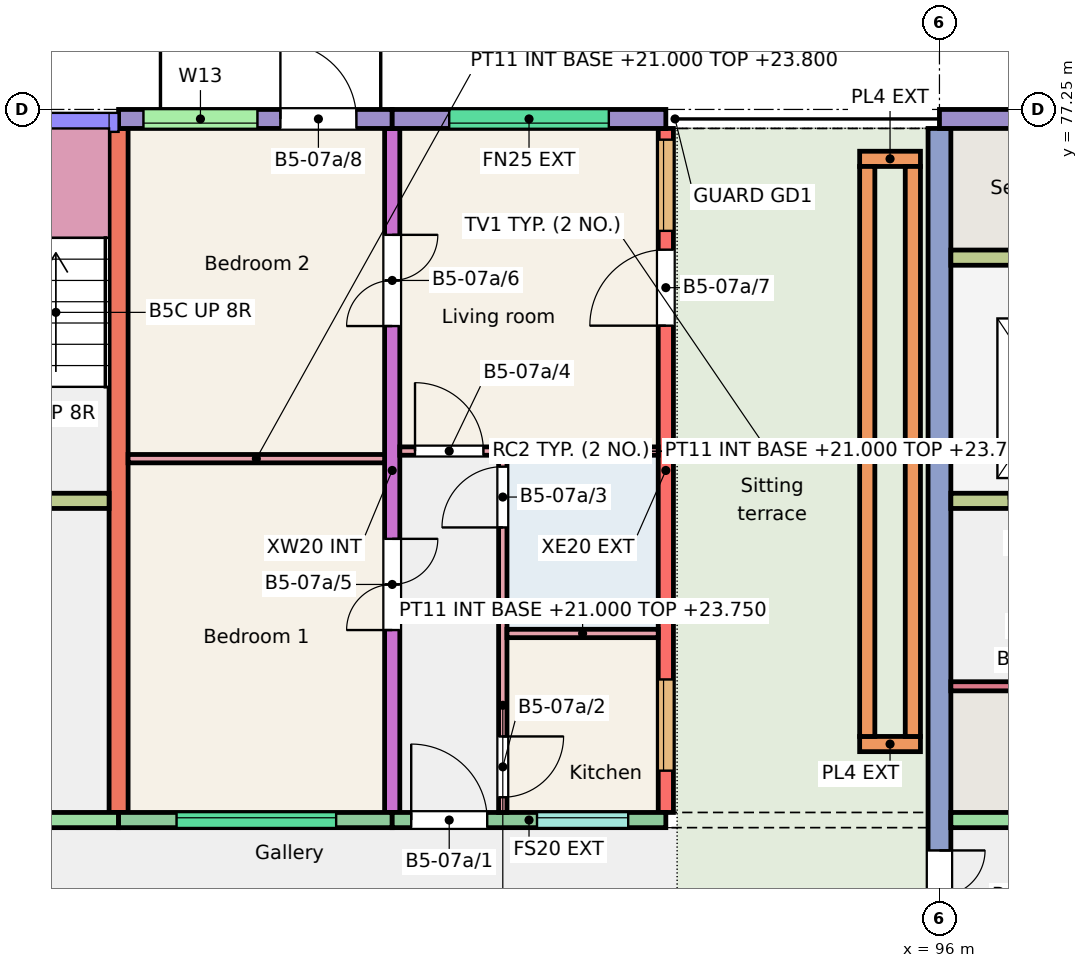
"""IFC4 building model, lengths in metres.
Left out: names, types, materials, properties, quantities, classifications, styles, units other than length and angle.
Written with IfcOpenShell. Run it as: python <this file> out.ifc"""

import sys

from ifc_helpers import new_model, si_unit, direction, frame, frame_2d, origin, place, context, subcontext, project, spatial, rectangle, extrude, element, fill, save


model = new_model("IFC4")
c1 = context("Model", 3, precision=1e-05, world=origin(), true_north=direction((0.0, 1.0)))
c2 = subcontext(c1, "Body", "Model", "MODEL_VIEW")
j1 = project(units=[si_unit("LENGTHUNIT", "METRE"), si_unit("PLANEANGLEUNIT", "RADIAN")], contexts=[c1])
p1 = place(None, origin())
s1 = spatial("IfcSite", under=j1, at=p1, CompositionType="ELEMENT")
p2 = place(p1, origin())
s2 = spatial("IfcBuilding", under=s1, at=p2, CompositionType="ELEMENT")
p3 = place(p2, frame((0.0, 0.0, 21.0)))
s3 = spatial("IfcBuildingStorey", under=s2, at=p3, CompositionType="ELEMENT", Elevation=21.0)
p4 = place(p3, frame((85.2, 68.0, 0.0), z_axis=(0.0, 0.0, 1.0), x_axis=(0.0, 1.0, 0.0)))
e1 = element("IfcWall", 1, at=p4, inside=s3, PredefinedType="SHEAR", context=c2, shape_type="SweptSolid", body=[
    extrude(rectangle(XDim=9.0, YDim=0.25, at=frame_2d((4.5, 0.0))), origin(), (0.0, 0.0, 1.0), 3.0),
])
p5 = place(p3, frame((88.8, 68.0, 0.0), z_axis=(0.0, 0.0, 1.0), x_axis=(0.0, 1.0, 0.0)))
e2 = element("IfcWall", 2, at=p5, inside=s3, PredefinedType="SHEAR", context=c2, shape_type="SweptSolid", body=[
    extrude(rectangle(XDim=9.0, YDim=0.2, at=frame_2d((4.5, 0.0))), origin(), (0.0, 0.0, 1.0), 3.0),
])
p6 = place(p5, frame((2.4, 0.0, 0.0)))
e3 = element("IfcOpeningElement", 3, at=p6, cuts=e2, PredefinedType="OPENING", context=c2, shape_type="SweptSolid", body=[
    extrude(rectangle(XDim=1.2, YDim=2.1, at=frame_2d((0.6, 1.05))), frame((0.0, 0.11, 0.0), z_axis=(0.0, -1.0, 0.0), x_axis=(1.0, 0.0, 0.0)), (0.0, 0.0, 1.0), 0.22),
])
p7 = place(p5, frame((6.4, 0.0, 0.0)))
e4 = element("IfcOpeningElement", 4, at=p7, cuts=e2, PredefinedType="OPENING", context=c2, shape_type="SweptSolid", body=[
    extrude(rectangle(XDim=1.2, YDim=2.1, at=frame_2d((0.6, 1.05))), frame((0.0, 0.11, 0.0), z_axis=(0.0, -1.0, 0.0), x_axis=(1.0, 0.0, 0.0)), (0.0, 0.0, 1.0), 0.22),
])
p8 = place(p3, frame((92.4, 68.0, 0.0), z_axis=(0.0, 0.0, 1.0), x_axis=(0.0, 1.0, 0.0)))
e5 = element("IfcWall", 5, at=p8, inside=s3, PredefinedType="SHEAR", context=c2, shape_type="SweptSolid", body=[
    extrude(rectangle(XDim=9.0, YDim=0.2, at=frame_2d((4.5, 0.0))), origin(), (0.0, 0.0, 1.0), 3.0),
])
p9 = place(p8, frame((0.55, 0.0, 0.9)))
e6 = element("IfcOpeningElement", 6, at=p9, cuts=e5, PredefinedType="OPENING", context=c2, shape_type="SweptSolid", body=[
    extrude(rectangle(XDim=1.2, YDim=1.5, at=frame_2d((0.6, 0.75))), frame((0.0, 0.11, 0.0), z_axis=(0.0, -1.0, 0.0), x_axis=(1.0, 0.0, 0.0)), (0.0, 0.0, 1.0), 0.22),
])
p10 = place(p8, frame((7.653, 0.0, 0.9)))
e7 = element("IfcOpeningElement", 7, at=p10, cuts=e5, PredefinedType="OPENING", context=c2, shape_type="SweptSolid", body=[
    extrude(rectangle(XDim=1.2, YDim=1.5, at=frame_2d((0.6, 0.75))), frame((0.0, 0.11, 0.0), z_axis=(0.0, -1.0, 0.0), x_axis=(1.0, 0.0, 0.0)), (0.0, 0.0, 1.0), 0.22),
])
p11 = place(p8, frame((6.405, 0.0, 0.0)))
e8 = element("IfcOpeningElement", 8, at=p11, cuts=e5, PredefinedType="OPENING", context=c2, shape_type="SweptSolid", body=[
    extrude(rectangle(XDim=1.0, YDim=2.1, at=frame_2d((0.5, 1.05))), frame((0.0, 0.11, 0.0), z_axis=(0.0, -1.0, 0.0), x_axis=(1.0, 0.0, 0.0)), (0.0, 0.0, 1.0), 0.22),
])
p12 = place(p3, frame((96.0, 66.0, 0.0), z_axis=(0.0, 0.0, 1.0), x_axis=(0.0, 1.0, 0.0)))
e9 = element("IfcWall", 9, at=p12, inside=s3, PredefinedType="SHEAR", context=c2, shape_type="SweptSolid", body=[
    extrude(rectangle(XDim=11.0, YDim=0.3, at=frame_2d((5.5, 0.0))), origin(), (0.0, 0.0, 1.0), 3.0),
])
p13 = place(p12, frame((0.3, 0.0, 0.0)))
e10 = element("IfcOpeningElement", 10, at=p13, cuts=e9, PredefinedType="OPENING", context=c2, shape_type="SweptSolid", body=[
    extrude(rectangle(XDim=1.2, YDim=2.1, at=frame_2d((0.6, 1.05))), frame((0.0, 0.16, 0.0), z_axis=(0.0, -1.0, 0.0), x_axis=(1.0, 0.0, 0.0)), (0.0, 0.0, 1.0), 0.32),
])
p14 = place(p3, frame((79.35, 67.9, 0.0), z_axis=(0.0, 0.0, 1.0), x_axis=(1.0, 0.0, 0.0)))
e11 = element("IfcWall", 11, at=p14, inside=s3, PredefinedType="SHEAR", context=c2, shape_type="SweptSolid", body=[
    extrude(rectangle(XDim=5.85, YDim=0.2, at=frame_2d((2.925, 0.0))), origin(), (0.0, 0.0, 1.0), 3.0),
])
p15 = place(p14, frame((2.312, 0.0, 0.0)))
e12 = element("IfcOpeningElement", 12, at=p15, cuts=e11, PredefinedType="OPENING", context=c2, shape_type="SweptSolid", body=[
    extrude(rectangle(XDim=1.1, YDim=2.1, at=frame_2d((0.55, 1.05))), frame((0.0, 0.11, 0.0), z_axis=(0.0, -1.0, 0.0), x_axis=(1.0, 0.0, 0.0)), (0.0, 0.0, 1.0), 0.22),
])
p16 = place(p3, frame((79.35, 72.1, 0.0), z_axis=(0.0, 0.0, 1.0), x_axis=(1.0, 0.0, 0.0)))
e13 = element("IfcWall", 13, at=p16, inside=s3, PredefinedType="SHEAR", context=c2, shape_type="SweptSolid", body=[
    extrude(rectangle(XDim=5.725, YDim=0.2, at=frame_2d((2.862, 0.0))), origin(), (0.0, 0.0, 1.0), 3.0),
])
p17 = place(p16, frame((3.775, 0.0, 0.0)))
e14 = element("IfcOpeningElement", 14, at=p17, cuts=e13, PredefinedType="OPENING", context=c2, shape_type="SweptSolid", body=[
    extrude(rectangle(XDim=1.0, YDim=2.1, at=frame_2d((0.5, 1.05))), frame((0.0, 0.11, 0.0), z_axis=(0.0, -1.0, 0.0), x_axis=(1.0, 0.0, 0.0)), (0.0, 0.0, 1.0), 0.22),
])
p18 = place(p16, frame((0.762, 0.0, 0.0)))
e15 = element("IfcOpeningElement", 15, at=p18, cuts=e13, PredefinedType="OPENING", context=c2, shape_type="SweptSolid", body=[
    extrude(rectangle(XDim=1.1, YDim=2.1, at=frame_2d((0.55, 1.05))), frame((0.0, 0.11, 0.0), z_axis=(0.0, -1.0, 0.0), x_axis=(1.0, 0.0, 0.0)), (0.0, 0.0, 1.0), 0.22),
])
p19 = place(p3, frame((85.2, 77.125, 0.0), z_axis=(0.0, 0.0, 1.0), x_axis=(1.0, 0.0, 0.0)))
e16 = element("IfcWall", 16, at=p19, inside=s3, PredefinedType="SOLIDWALL", context=c2, shape_type="SweptSolid", body=[
    extrude(rectangle(XDim=3.6, YDim=0.25, at=frame_2d((1.8, 0.0))), origin(), (0.0, 0.0, 1.0), 3.0),
])
p20 = place(p19, frame((0.327, 0.0, 1.2)))
e17 = element("IfcOpeningElement", 17, at=p20, cuts=e16, PredefinedType="OPENING", context=c2, shape_type="SweptSolid", body=[
    extrude(rectangle(XDim=1.5, YDim=1.2, at=frame_2d((0.75, 0.6))), frame((0.0, 0.135, 0.0), z_axis=(0.0, -1.0, 0.0), x_axis=(1.0, 0.0, 0.0)), (0.0, 0.0, 1.0), 0.27),
])
p21 = place(p19, frame((2.129, 0.0, 0.0)))
e18 = element("IfcOpeningElement", 18, at=p21, cuts=e16, PredefinedType="OPENING", context=c2, shape_type="SweptSolid", body=[
    extrude(rectangle(XDim=1.0, YDim=2.1, at=frame_2d((0.5, 1.05))), frame((0.0, 0.135, 0.0), z_axis=(0.0, -1.0, 0.0), x_axis=(1.0, 0.0, 0.0)), (0.0, 0.0, 1.0), 0.27),
])
p22 = place(p3, frame((85.2, 67.9, 0.0), z_axis=(0.0, 0.0, 1.0), x_axis=(1.0, 0.0, 0.0)))
e19 = element("IfcWall", 19, at=p22, inside=s3, PredefinedType="SOLIDWALL", context=c2, shape_type="SweptSolid", body=[
    extrude(rectangle(XDim=3.6, YDim=0.2, at=frame_2d((1.8, 0.0))), origin(), (0.0, 0.0, 1.0), 3.0),
])
p23 = place(p22, frame((0.762, 0.0, 1.2)))
e20 = element("IfcOpeningElement", 20, at=p23, cuts=e19, PredefinedType="OPENING", context=c2, shape_type="SweptSolid", body=[
    extrude(rectangle(XDim=2.1, YDim=1.2, at=frame_2d((1.05, 0.6))), frame((0.0, 0.11, 0.0), z_axis=(0.0, -1.0, 0.0), x_axis=(1.0, 0.0, 0.0)), (0.0, 0.0, 1.0), 0.22),
])
p24 = place(p3, frame((88.8, 77.125, 0.0), z_axis=(0.0, 0.0, 1.0), x_axis=(1.0, 0.0, 0.0)))
e21 = element("IfcWall", 21, at=p24, inside=s3, PredefinedType="SOLIDWALL", context=c2, shape_type="SweptSolid", body=[
    extrude(rectangle(XDim=3.6, YDim=0.25, at=frame_2d((1.8, 0.0))), origin(), (0.0, 0.0, 1.0), 3.0),
])
p25 = place(p24, frame((0.75, 0.0, 1.2)))
e22 = element("IfcOpeningElement", 22, at=p25, cuts=e21, PredefinedType="OPENING", context=c2, shape_type="SweptSolid", body=[
    extrude(rectangle(XDim=2.1, YDim=1.2, at=frame_2d((1.05, 0.6))), frame((0.0, 0.135, 0.0), z_axis=(0.0, -1.0, 0.0), x_axis=(1.0, 0.0, 0.0)), (0.0, 0.0, 1.0), 0.27),
])
p26 = place(p3, frame((88.8, 67.9, 0.0), z_axis=(0.0, 0.0, 1.0), x_axis=(1.0, 0.0, 0.0)))
e23 = element("IfcWall", 23, at=p26, inside=s3, PredefinedType="SOLIDWALL", context=c2, shape_type="SweptSolid", body=[
    extrude(rectangle(XDim=3.6, YDim=0.2, at=frame_2d((1.8, 0.0))), origin(), (0.0, 0.0, 1.0), 3.0),
])
p27 = place(p26, frame((1.905, 0.0, 1.1)))
e24 = element("IfcOpeningElement", 24, at=p27, cuts=e23, PredefinedType="OPENING", context=c2, shape_type="SweptSolid", body=[
    extrude(rectangle(XDim=1.2, YDim=1.3, at=frame_2d((0.6, 0.65))), frame((0.0, 0.11, 0.0), z_axis=(0.0, -1.0, 0.0), x_axis=(1.0, 0.0, 0.0)), (0.0, 0.0, 1.0), 0.22),
])
p28 = place(p26, frame((0.25, 0.0, 0.0)))
e25 = element("IfcOpeningElement", 25, at=p28, cuts=e23, PredefinedType="OPENING", context=c2, shape_type="SweptSolid", body=[
    extrude(rectangle(XDim=1.0, YDim=2.1, at=frame_2d((0.5, 1.05))), frame((0.0, 0.11, 0.0), z_axis=(0.0, -1.0, 0.0), x_axis=(1.0, 0.0, 0.0)), (0.0, 0.0, 1.0), 0.22),
])
p29 = place(p3, frame((96.0, 77.125, 0.0), z_axis=(0.0, 0.0, 1.0), x_axis=(1.0, 0.0, 0.0)))
e26 = element("IfcWall", 26, at=p29, inside=s3, PredefinedType="SOLIDWALL", context=c2, shape_type="SweptSolid", body=[
    extrude(rectangle(XDim=2.975, YDim=0.25, at=frame_2d((1.488, 0.0))), origin(), (0.0, 0.0, 1.0), 3.0),
])
p30 = place(p3, frame((96.15, 67.9, 0.0), z_axis=(0.0, 0.0, 1.0), x_axis=(1.0, 0.0, 0.0)))
e27 = element("IfcWall", 27, at=p30, inside=s3, PredefinedType="SHEAR", context=c2, shape_type="SweptSolid", body=[
    extrude(rectangle(XDim=5.85, YDim=0.2, at=frame_2d((2.925, 0.0))), origin(), (0.0, 0.0, 1.0), 3.0),
])
p31 = place(p30, frame((2.312, 0.0, 0.0)))
e28 = element("IfcOpeningElement", 28, at=p31, cuts=e27, PredefinedType="OPENING", context=c2, shape_type="SweptSolid", body=[
    extrude(rectangle(XDim=1.1, YDim=2.1, at=frame_2d((0.55, 1.05))), frame((0.0, 0.11, 0.0), z_axis=(0.0, -1.0, 0.0), x_axis=(1.0, 0.0, 0.0)), (0.0, 0.0, 1.0), 0.22),
])
p32 = place(p3, frame((96.15, 72.1, 0.0), z_axis=(0.0, 0.0, 1.0), x_axis=(1.0, 0.0, 0.0)))
e29 = element("IfcWall", 29, at=p32, inside=s3, PredefinedType="SHEAR", context=c2, shape_type="SweptSolid", body=[
    extrude(rectangle(XDim=5.725, YDim=0.2, at=frame_2d((2.863, 0.0))), origin(), (0.0, 0.0, 1.0), 3.0),
])
p33 = place(p32, frame((3.775, 0.0, 0.0)))
e30 = element("IfcOpeningElement", 30, at=p33, cuts=e29, PredefinedType="OPENING", context=c2, shape_type="SweptSolid", body=[
    extrude(rectangle(XDim=1.0, YDim=2.1, at=frame_2d((0.5, 1.05))), frame((0.0, 0.11, 0.0), z_axis=(0.0, -1.0, 0.0), x_axis=(1.0, 0.0, 0.0)), (0.0, 0.0, 1.0), 0.22),
])
p34 = place(p32, frame((0.762, 0.0, 0.0)))
e31 = element("IfcOpeningElement", 31, at=p34, cuts=e29, PredefinedType="OPENING", context=c2, shape_type="SweptSolid", body=[
    extrude(rectangle(XDim=1.1, YDim=2.1, at=frame_2d((0.55, 1.05))), frame((0.0, 0.11, 0.0), z_axis=(0.0, -1.0, 0.0), x_axis=(1.0, 0.0, 0.0)), (0.0, 0.0, 1.0), 0.22),
])
p35 = place(p3, frame((96.15, 75.3, 0.0), z_axis=(0.0, 0.0, 1.0), x_axis=(1.0, 0.0, 0.0)))
e32 = element("IfcWall", 32, at=p35, inside=s3, PredefinedType="SHEAR", context=c2, shape_type="SweptSolid", body=[
    extrude(rectangle(XDim=2.625, YDim=0.2, at=frame_2d((1.312, 0.0))), origin(), (0.0, 0.0, 1.0), 3.0),
])
p36 = place(p3, frame((96.15, 69.66, 0.0), z_axis=(0.0, 0.0, 1.0), x_axis=(1.0, 0.0, 0.0)))
e33 = element("IfcWall", 33, at=p36, inside=s3, PredefinedType="SHEAR", context=c2, shape_type="SweptSolid", body=[
    extrude(rectangle(XDim=1.13, YDim=0.12, at=frame_2d((0.565, 0.0))), origin(), (0.0, 0.0, 1.0), 3.0),
])
for number, where, z_axis, x_axis in (
    (34, (94.95, 68.9, 0.01), (0.0, 0.0, 1.0), (1.0, 0.0, 0.0)),
    (35, (94.95, 76.6, 0.01), (0.0, 0.0, 1.0), (1.0, 0.0, 0.0)),
):
    element("IfcWall", number, at=place(p3, frame(where, z_axis=z_axis, x_axis=x_axis)), inside=s3, PredefinedType="SOLIDWALL", context=c2, shape_type="SweptSolid", body=[
        extrude(rectangle(XDim=0.8, YDim=0.2, at=frame_2d((0.4, 0.0))), origin(), (0.0, 0.0, 1.0), 0.45),
    ])
for number, where, z_axis, x_axis in (
    (36, (95.05, 69.0, 0.01), (0.0, 0.0, 1.0), (0.0, 1.0, 0.0)),
    (37, (95.65, 69.0, 0.01), (0.0, 0.0, 1.0), (0.0, 1.0, 0.0)),
):
    element("IfcWall", number, at=place(p3, frame(where, z_axis=z_axis, x_axis=x_axis)), inside=s3, PredefinedType="SOLIDWALL", context=c2, shape_type="SweptSolid", body=[
        extrude(rectangle(XDim=7.5, YDim=0.2, at=frame_2d((3.75, 0.0))), origin(), (0.0, 0.0, 1.0), 0.45),
    ])
p37 = place(p3, frame((90.255, 68.0, 0.0), z_axis=(0.0, 0.0, 1.0), x_axis=(0.0, 1.0, 0.0)))
e38 = element("IfcWall", 38, at=p37, inside=s3, PredefinedType="PARTITIONING", context=c2, shape_type="SweptSolid", body=[
    extrude(rectangle(XDim=4.7, YDim=0.11, at=frame_2d((2.35, 0.0))), origin(), (0.0, 0.0, 1.0), 2.75),
])
p38 = place(p37, frame((0.2, 0.0, 0.0)))
e39 = element("IfcOpeningElement", 39, at=p38, cuts=e38, PredefinedType="OPENING", context=c2, shape_type="SweptSolid", body=[
    extrude(rectangle(XDim=0.8, YDim=2.1, at=frame_2d((0.4, 1.05))), frame((0.0, 0.065, 0.0), z_axis=(0.0, -1.0, 0.0), x_axis=(1.0, 0.0, 0.0)), (0.0, 0.0, 1.0), 0.13),
])
p39 = place(p37, frame((3.75, 0.0, 0.0)))
e40 = element("IfcOpeningElement", 40, at=p39, cuts=e38, PredefinedType="OPENING", context=c2, shape_type="SweptSolid", body=[
    extrude(rectangle(XDim=0.8, YDim=2.1, at=frame_2d((0.4, 1.05))), frame((0.0, 0.065, 0.0), z_axis=(0.0, -1.0, 0.0), x_axis=(1.0, 0.0, 0.0)), (0.0, 0.0, 1.0), 0.13),
])
p40 = place(p3, frame((90.31, 70.355, 0.0), z_axis=(0.0, 0.0, 1.0), x_axis=(1.0, 0.0, 0.0)))
e41 = element("IfcWall", 41, at=p40, inside=s3, PredefinedType="PARTITIONING", context=c2, shape_type="SweptSolid", body=[
    extrude(rectangle(XDim=1.99, YDim=0.11, at=frame_2d((0.995, 0.0))), origin(), (0.0, 0.0, 1.0), 2.75),
])
p41 = place(p3, frame((88.9, 72.755, 0.0), z_axis=(0.0, 0.0, 1.0), x_axis=(1.0, 0.0, 0.0)))
e42 = element("IfcWall", 42, at=p41, inside=s3, PredefinedType="PARTITIONING", context=c2, shape_type="SweptSolid", body=[
    extrude(rectangle(XDim=3.4, YDim=0.11, at=frame_2d((1.7, 0.0))), origin(), (0.0, 0.0, 1.0), 2.75),
])
p42 = place(p41, frame((0.2, 0.0, 0.0)))
e43 = element("IfcOpeningElement", 43, at=p42, cuts=e42, PredefinedType="OPENING", context=c2, shape_type="SweptSolid", body=[
    extrude(rectangle(XDim=0.9, YDim=2.1, at=frame_2d((0.45, 1.05))), frame((0.0, 0.065, 0.0), z_axis=(0.0, -1.0, 0.0), x_axis=(1.0, 0.0, 0.0)), (0.0, 0.0, 1.0), 0.13),
])
p43 = place(p3, frame((85.325, 72.655, 0.0), z_axis=(0.0, 0.0, 1.0), x_axis=(1.0, 0.0, 0.0)))
e44 = element("IfcWall", 44, at=p43, inside=s3, PredefinedType="PARTITIONING", context=c2, shape_type="SweptSolid", body=[
    extrude(rectangle(XDim=3.375, YDim=0.11, at=frame_2d((1.688, 0.0))), origin(), (0.0, 0.0, 1.0), 2.8),
])
p44 = place(p23, origin())
e45 = element("IfcWindow", 45, at=p44, inside=s3, PartitioningType="SINGLE_PANEL", PredefinedType="WINDOW", context=c2, shape_type="SweptSolid", body=[
    extrude(rectangle(XDim=2.1, YDim=1.2, at=frame_2d((1.05, 0.6))), frame((0.0, 0.06, 0.0), z_axis=(0.0, -1.0, 0.0), x_axis=(1.0, 0.0, 0.0)), (0.0, 0.0, 1.0), 0.06),
])
fill(e20, e45)
p45 = place(p20, origin())
e46 = element("IfcWindow", 46, at=p45, inside=s3, PartitioningType="SINGLE_PANEL", PredefinedType="WINDOW", context=c2, shape_type="SweptSolid", body=[
    extrude(rectangle(XDim=1.5, YDim=1.2, at=frame_2d((0.75, 0.6))), frame((0.0, -0.025, 0.0), z_axis=(0.0, -1.0, 0.0), x_axis=(1.0, 0.0, 0.0)), (0.0, 0.0, 1.0), 0.06),
])
fill(e17, e46)
p46 = place(p27, origin())
e47 = element("IfcWindow", 47, at=p46, inside=s3, PartitioningType="SINGLE_PANEL", PredefinedType="WINDOW", context=c2, shape_type="SweptSolid", body=[
    extrude(rectangle(XDim=1.2, YDim=1.3, at=frame_2d((0.6, 0.65))), frame((0.0, 0.06, 0.0), z_axis=(0.0, -1.0, 0.0), x_axis=(1.0, 0.0, 0.0)), (0.0, 0.0, 1.0), 0.06),
])
fill(e24, e47)
p47 = place(p25, origin())
e48 = element("IfcWindow", 48, at=p47, inside=s3, PartitioningType="SINGLE_PANEL", PredefinedType="WINDOW", context=c2, shape_type="SweptSolid", body=[
    extrude(rectangle(XDim=2.1, YDim=1.2, at=frame_2d((1.05, 0.6))), frame((0.0, -0.025, 0.0), z_axis=(0.0, -1.0, 0.0), x_axis=(1.0, 0.0, 0.0)), (0.0, 0.0, 1.0), 0.06),
])
fill(e22, e48)
p48 = place(p9, origin())
e49 = element("IfcWindow", 49, at=p48, inside=s3, PartitioningType="SINGLE_PANEL", PredefinedType="WINDOW", context=c2, shape_type="SweptSolid", body=[
    extrude(rectangle(XDim=1.2, YDim=1.5, at=frame_2d((0.6, 0.75))), frame((0.0, 0.06, 0.0), z_axis=(0.0, -1.0, 0.0), x_axis=(1.0, 0.0, 0.0)), (0.0, 0.0, 1.0), 0.06),
])
fill(e6, e49)
p49 = place(p10, origin())
e50 = element("IfcWindow", 50, at=p49, inside=s3, PartitioningType="SINGLE_PANEL", PredefinedType="WINDOW", context=c2, shape_type="SweptSolid", body=[
    extrude(rectangle(XDim=1.2, YDim=1.5, at=frame_2d((0.6, 0.75))), frame((0.0, 0.06, 0.0), z_axis=(0.0, -1.0, 0.0), x_axis=(1.0, 0.0, 0.0)), (0.0, 0.0, 1.0), 0.06),
])
fill(e7, e50)
p50 = place(p28, origin())
e51 = element("IfcDoor", 51, at=p50, inside=s3, OperationType="SINGLE_SWING_LEFT", PredefinedType="DOOR", context=c2, shape_type="SweptSolid", body=[
    extrude(rectangle(XDim=1.0, YDim=2.1, at=frame_2d((0.5, 1.05))), frame((0.0, 0.025, 0.0), z_axis=(0.0, -1.0, 0.0), x_axis=(1.0, 0.0, 0.0)), (0.0, 0.0, 1.0), 0.05),
])
fill(e25, e51)
p51 = place(p38, origin())
e52 = element("IfcDoor", 52, at=p51, inside=s3, OperationType="SINGLE_SWING_RIGHT", PredefinedType="DOOR", context=c2, shape_type="SweptSolid", body=[
    extrude(rectangle(XDim=0.8, YDim=2.1, at=frame_2d((0.4, 1.05))), frame((0.0, 0.025, 0.0), z_axis=(0.0, -1.0, 0.0), x_axis=(1.0, 0.0, 0.0)), (0.0, 0.0, 1.0), 0.05),
])
fill(e39, e52)
p52 = place(p39, origin())
e53 = element("IfcDoor", 53, at=p52, inside=s3, OperationType="SINGLE_SWING_LEFT", PredefinedType="DOOR", context=c2, shape_type="SweptSolid", body=[
    extrude(rectangle(XDim=0.8, YDim=2.1, at=frame_2d((0.4, 1.05))), frame((0.0, 0.025, 0.0), z_axis=(0.0, -1.0, 0.0), x_axis=(1.0, 0.0, 0.0)), (0.0, 0.0, 1.0), 0.05),
])
fill(e40, e53)
p53 = place(p42, origin())
e54 = element("IfcDoor", 54, at=p53, inside=s3, OperationType="SINGLE_SWING_LEFT", PredefinedType="DOOR", context=c2, shape_type="SweptSolid", body=[
    extrude(rectangle(XDim=0.9, YDim=2.1, at=frame_2d((0.45, 1.05))), frame((0.0, 0.025, 0.0), z_axis=(0.0, -1.0, 0.0), x_axis=(1.0, 0.0, 0.0)), (0.0, 0.0, 1.0), 0.05),
])
fill(e43, e54)
p54 = place(p6, origin())
e55 = element("IfcDoor", 55, at=p54, inside=s3, OperationType="DOUBLE_DOOR_SINGLE_SWING", PredefinedType="DOOR", context=c2, shape_type="SweptSolid", body=[
    extrude(rectangle(XDim=1.2, YDim=2.1, at=frame_2d((0.6, 1.05))), frame((0.0, 0.025, 0.0), z_axis=(0.0, -1.0, 0.0), x_axis=(1.0, 0.0, 0.0)), (0.0, 0.0, 1.0), 0.05),
])
fill(e3, e55)
p55 = place(p7, origin())
e56 = element("IfcDoor", 56, at=p55, inside=s3, OperationType="DOUBLE_DOOR_SINGLE_SWING", PredefinedType="DOOR", context=c2, shape_type="SweptSolid", body=[
    extrude(rectangle(XDim=1.2, YDim=2.1, at=frame_2d((0.6, 1.05))), frame((0.0, 0.025, 0.0), z_axis=(0.0, -1.0, 0.0), x_axis=(1.0, 0.0, 0.0)), (0.0, 0.0, 1.0), 0.05),
])
fill(e4, e56)
p56 = place(p11, origin())
e57 = element("IfcDoor", 57, at=p56, inside=s3, OperationType="SINGLE_SWING_LEFT", PredefinedType="DOOR", context=c2, shape_type="SweptSolid", body=[
    extrude(rectangle(XDim=1.0, YDim=2.1, at=frame_2d((0.5, 1.05))), frame((0.0, 0.025, 0.0), z_axis=(0.0, -1.0, 0.0), x_axis=(1.0, 0.0, 0.0)), (0.0, 0.0, 1.0), 0.05),
])
fill(e8, e57)
p57 = place(p21, origin())
e58 = element("IfcDoor", 58, at=p57, inside=s3, OperationType="SINGLE_SWING_LEFT", PredefinedType="DOOR", context=c2, shape_type="SweptSolid", body=[
    extrude(rectangle(XDim=1.0, YDim=2.1, at=frame_2d((0.5, 1.05))), frame((0.0, 0.025, 0.0), z_axis=(0.0, -1.0, 0.0), x_axis=(1.0, 0.0, 0.0)), (0.0, 0.0, 1.0), 0.05),
])
fill(e18, e58)
p58 = place(p13, origin())
e59 = element("IfcDoor", 59, at=p58, inside=s3, OperationType="DOUBLE_DOOR_SINGLE_SWING", PredefinedType="DOOR", context=c2, shape_type="SweptSolid", body=[
    extrude(rectangle(XDim=1.2, YDim=2.1, at=frame_2d((0.6, 1.05))), frame((0.0, 0.025, 0.0), z_axis=(0.0, -1.0, 0.0), x_axis=(1.0, 0.0, 0.0)), (0.0, 0.0, 1.0), 0.05),
])
fill(e10, e59)
save(model, sys.argv[1])
